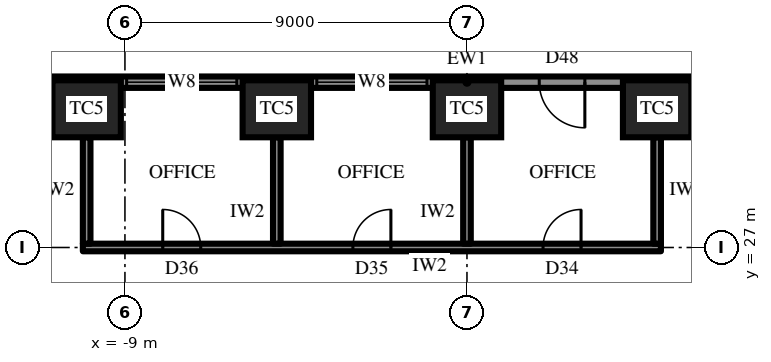
"""IFC4 building model, lengths in metres.
Left out: names, types, materials, properties, quantities, classifications, styles, units other than length and angle.
Written with IfcOpenShell. Run it as: python <this file> out.ifc"""

import sys

from ifc_helpers import new_model, si_unit, direction, frame, frame_2d, origin, origin_2d, place, context, subcontext, project, spatial, rectangle, extrude, element, fill, save


model = new_model("IFC4")
c1 = context("Model", 3, precision=1e-05, world=origin(), true_north=direction((0.0, 1.0)))
c2 = subcontext(c1, "Body", "Model", "MODEL_VIEW")
j1 = project(units=[si_unit("LENGTHUNIT", "METRE"), si_unit("PLANEANGLEUNIT", "RADIAN")], contexts=[c1])
p1 = place(None, origin())
s1 = spatial("IfcSite", under=j1, at=p1, CompositionType="ELEMENT")
p2 = place(p1, origin())
s2 = spatial("IfcBuilding", under=s1, at=p2, CompositionType="ELEMENT")
p3 = place(p2, frame((0.0, 0.0, 123.7)))
s3 = spatial("IfcBuildingStorey", under=s2, at=p3, CompositionType="ELEMENT", Elevation=123.7)
for number, where, z_axis, x_axis in (
    (1, (5.004, 30.65, 0.0), (0.0, 0.0, 1.0), (-1.0, 0.0, 0.0)),
    (2, (0.0, 30.65, 0.0), (0.0, 0.0, 1.0), (-1.0, 0.0, 0.0)),
    (3, (-5.004, 30.65, 0.0), (0.0, 0.0, 1.0), (-1.0, 0.0, 0.0)),
    (4, (-10.007, 30.65, 0.0), (0.0, 0.0, 1.0), (-1.0, 0.0, 0.0)),
):
    element("IfcColumn", number, at=place(p3, frame(where, z_axis=z_axis, x_axis=x_axis)), inside=s3, PredefinedType="COLUMN", context=c2, shape_type="SweptSolid", body=[
        extrude(rectangle(XDim=1.8, YDim=1.5, at=origin_2d()), origin(), (0.0, 0.0, 1.0), 4.2),
    ])
p4 = place(p3, frame((15.011, 31.35, 0.0), z_axis=(0.0, 0.0, 1.0), x_axis=(-1.0, 0.0, 0.0)))
e5 = element("IfcWall", 5, at=p4, inside=s3, PredefinedType="SOLIDWALL", context=c2, shape_type="SweptSolid", body=[
    extrude(rectangle(XDim=30.022, YDim=0.3, at=frame_2d((15.011, 0.0))), origin(), (0.0, 0.0, 1.0), 2.3),
])
p5 = place(p4, frame((1.052, 0.0, 0.6)))
e6 = element("IfcOpeningElement", 6, at=p5, cuts=e5, PredefinedType="OPENING", context=c2, shape_type="SweptSolid", body=[
    extrude(rectangle(XDim=2.9, YDim=1.45, at=frame_2d((1.45, 0.725))), frame((0.0, 0.16, 0.0), z_axis=(0.0, -1.0, 0.0), x_axis=(1.0, 0.0, 0.0)), (0.0, 0.0, 1.0), 0.32),
])
p6 = place(p4, frame((6.056, 0.0, 0.6)))
e7 = element("IfcOpeningElement", 7, at=p6, cuts=e5, PredefinedType="OPENING", context=c2, shape_type="SweptSolid", body=[
    extrude(rectangle(XDim=2.9, YDim=1.45, at=frame_2d((1.45, 0.725))), frame((0.0, 0.16, 0.0), z_axis=(0.0, -1.0, 0.0), x_axis=(1.0, 0.0, 0.0)), (0.0, 0.0, 1.0), 0.32),
])
p7 = place(p4, frame((11.909, 0.0, 0.0)))
e8 = element("IfcOpeningElement", 8, at=p7, cuts=e5, PredefinedType="OPENING", context=c2, shape_type="SweptSolid", body=[
    extrude(rectangle(XDim=1.2, YDim=2.2, at=frame_2d((0.6, 1.1))), frame((0.0, 0.16, 0.0), z_axis=(0.0, -1.0, 0.0), x_axis=(1.0, 0.0, 0.0)), (0.0, 0.0, 1.0), 0.32),
])
p8 = place(p4, frame((16.063, 0.0, 0.6)))
e9 = element("IfcOpeningElement", 9, at=p8, cuts=e5, PredefinedType="OPENING", context=c2, shape_type="SweptSolid", body=[
    extrude(rectangle(XDim=2.9, YDim=1.45, at=frame_2d((1.45, 0.725))), frame((0.0, 0.16, 0.0), z_axis=(0.0, -1.0, 0.0), x_axis=(1.0, 0.0, 0.0)), (0.0, 0.0, 1.0), 0.32),
])
p9 = place(p4, frame((21.067, 0.0, 0.6)))
e10 = element("IfcOpeningElement", 10, at=p9, cuts=e5, PredefinedType="OPENING", context=c2, shape_type="SweptSolid", body=[
    extrude(rectangle(XDim=2.9, YDim=1.45, at=frame_2d((1.45, 0.725))), frame((0.0, 0.16, 0.0), z_axis=(0.0, -1.0, 0.0), x_axis=(1.0, 0.0, 0.0)), (0.0, 0.0, 1.0), 0.32),
])
p10 = place(p4, frame((26.07, 0.0, 0.6)))
e11 = element("IfcOpeningElement", 11, at=p10, cuts=e5, PredefinedType="OPENING", context=c2, shape_type="SweptSolid", body=[
    extrude(rectangle(XDim=2.9, YDim=1.45, at=frame_2d((1.45, 0.725))), frame((0.0, 0.16, 0.0), z_axis=(0.0, -1.0, 0.0), x_axis=(1.0, 0.0, 0.0)), (0.0, 0.0, 1.0), 0.32),
])
p11 = place(p3, frame((5.104, 27.0, 0.0), z_axis=(0.0, 0.0, 1.0), x_axis=(-1.0, 0.0, 0.0)))
e12 = element("IfcWall", 12, at=p11, inside=s3, PredefinedType="PARTITIONING", context=c2, shape_type="SweptSolid", body=[
    extrude(rectangle(XDim=15.211, YDim=0.2, at=frame_2d((7.605, 0.0))), origin(), (0.0, 0.0, 1.0), 4.0),
])
p12 = place(p11, frame((2.102, 0.0, 0.0)))
e13 = element("IfcOpeningElement", 13, at=p12, cuts=e12, PredefinedType="OPENING", context=c2, shape_type="SweptSolid", body=[
    extrude(rectangle(XDim=1.0, YDim=2.2, at=frame_2d((0.5, 1.1))), frame((0.0, 0.11, 0.0), z_axis=(0.0, -1.0, 0.0), x_axis=(1.0, 0.0, 0.0)), (0.0, 0.0, 1.0), 0.22),
])
p13 = place(p11, frame((7.105, 0.0, 0.0)))
e14 = element("IfcOpeningElement", 14, at=p13, cuts=e12, PredefinedType="OPENING", context=c2, shape_type="SweptSolid", body=[
    extrude(rectangle(XDim=1.0, YDim=2.2, at=frame_2d((0.5, 1.1))), frame((0.0, 0.11, 0.0), z_axis=(0.0, -1.0, 0.0), x_axis=(1.0, 0.0, 0.0)), (0.0, 0.0, 1.0), 0.22),
])
p14 = place(p11, frame((12.109, 0.0, 0.0)))
e15 = element("IfcOpeningElement", 15, at=p14, cuts=e12, PredefinedType="OPENING", context=c2, shape_type="SweptSolid", body=[
    extrude(rectangle(XDim=1.0, YDim=2.2, at=frame_2d((0.5, 1.1))), frame((0.0, 0.11, 0.0), z_axis=(0.0, -1.0, 0.0), x_axis=(1.0, 0.0, 0.0)), (0.0, 0.0, 1.0), 0.22),
])
for number, where, z_axis, x_axis in (
    (16, (5.004, 27.1, 0.0), (0.0, 0.0, 1.0), (0.0, 1.0, 0.0)),
    (17, (0.0, 27.1, 0.0), (0.0, 0.0, 1.0), (0.0, 1.0, 0.0)),
    (18, (-5.004, 27.1, 0.0), (0.0, 0.0, 1.0), (0.0, 1.0, 0.0)),
    (19, (-10.007, 27.1, 0.0), (0.0, 0.0, 1.0), (0.0, 1.0, 0.0)),
):
    element("IfcWall", number, at=place(p3, frame(where, z_axis=z_axis, x_axis=x_axis)), inside=s3, PredefinedType="PARTITIONING", context=c2, shape_type="SweptSolid", body=[
        extrude(rectangle(XDim=2.8, YDim=0.2, at=frame_2d((1.4, 0.0))), origin(), (0.0, 0.0, 1.0), 2.992),
    ])
p15 = place(p7, origin())
e20 = element("IfcDoor", 20, at=p15, inside=s3, OperationType="SINGLE_SWING_RIGHT", PredefinedType="DOOR", context=c2, shape_type="SweptSolid", body=[
    extrude(rectangle(XDim=1.2, YDim=2.2, at=frame_2d((0.6, 1.1))), frame((0.0, 0.025, 0.0), z_axis=(0.0, -1.0, 0.0), x_axis=(1.0, 0.0, 0.0)), (0.0, 0.0, 1.0), 0.05),
])
fill(e8, e20)
p16 = place(p8, origin())
e21 = element("IfcWindow", 21, at=p16, inside=s3, PartitioningType="SINGLE_PANEL", PredefinedType="WINDOW", context=c2, shape_type="SweptSolid", body=[
    extrude(rectangle(XDim=2.9, YDim=1.45, at=frame_2d((1.45, 0.725))), frame((0.0, 0.03, 0.0), z_axis=(0.0, -1.0, 0.0), x_axis=(1.0, 0.0, 0.0)), (0.0, 0.0, 1.0), 0.06),
])
fill(e9, e21)
p17 = place(p9, origin())
e22 = element("IfcWindow", 22, at=p17, inside=s3, PartitioningType="SINGLE_PANEL", PredefinedType="WINDOW", context=c2, shape_type="SweptSolid", body=[
    extrude(rectangle(XDim=2.9, YDim=1.45, at=frame_2d((1.45, 0.725))), frame((0.0, 0.03, 0.0), z_axis=(0.0, -1.0, 0.0), x_axis=(1.0, 0.0, 0.0)), (0.0, 0.0, 1.0), 0.06),
])
fill(e10, e22)
p18 = place(p12, frame((1.0, 0.0, 0.0), z_axis=(0.0, 0.0, 1.0), x_axis=(-1.0, 0.0, 0.0)))
e23 = element("IfcDoor", 23, at=p18, inside=s3, OperationType="SINGLE_SWING_LEFT", PredefinedType="DOOR", context=c2, shape_type="SweptSolid", body=[
    extrude(rectangle(XDim=1.0, YDim=2.2, at=frame_2d((0.5, 1.1))), frame((0.0, 0.025, 0.0), z_axis=(0.0, -1.0, 0.0), x_axis=(1.0, 0.0, 0.0)), (0.0, 0.0, 1.0), 0.05),
])
fill(e13, e23)
p19 = place(p13, frame((1.0, 0.0, 0.0), z_axis=(0.0, 0.0, 1.0), x_axis=(-1.0, 0.0, 0.0)))
e24 = element("IfcDoor", 24, at=p19, inside=s3, OperationType="SINGLE_SWING_LEFT", PredefinedType="DOOR", context=c2, shape_type="SweptSolid", body=[
    extrude(rectangle(XDim=1.0, YDim=2.2, at=frame_2d((0.5, 1.1))), frame((0.0, 0.025, 0.0), z_axis=(0.0, -1.0, 0.0), x_axis=(1.0, 0.0, 0.0)), (0.0, 0.0, 1.0), 0.05),
])
fill(e14, e24)
p20 = place(p14, frame((1.0, 0.0, 0.0), z_axis=(0.0, 0.0, 1.0), x_axis=(-1.0, 0.0, 0.0)))
e25 = element("IfcDoor", 25, at=p20, inside=s3, OperationType="SINGLE_SWING_RIGHT", PredefinedType="DOOR", context=c2, shape_type="SweptSolid", body=[
    extrude(rectangle(XDim=1.0, YDim=2.2, at=frame_2d((0.5, 1.1))), frame((0.0, 0.025, 0.0), z_axis=(0.0, -1.0, 0.0), x_axis=(1.0, 0.0, 0.0)), (0.0, 0.0, 1.0), 0.05),
])
fill(e15, e25)
save(model, sys.argv[1])
